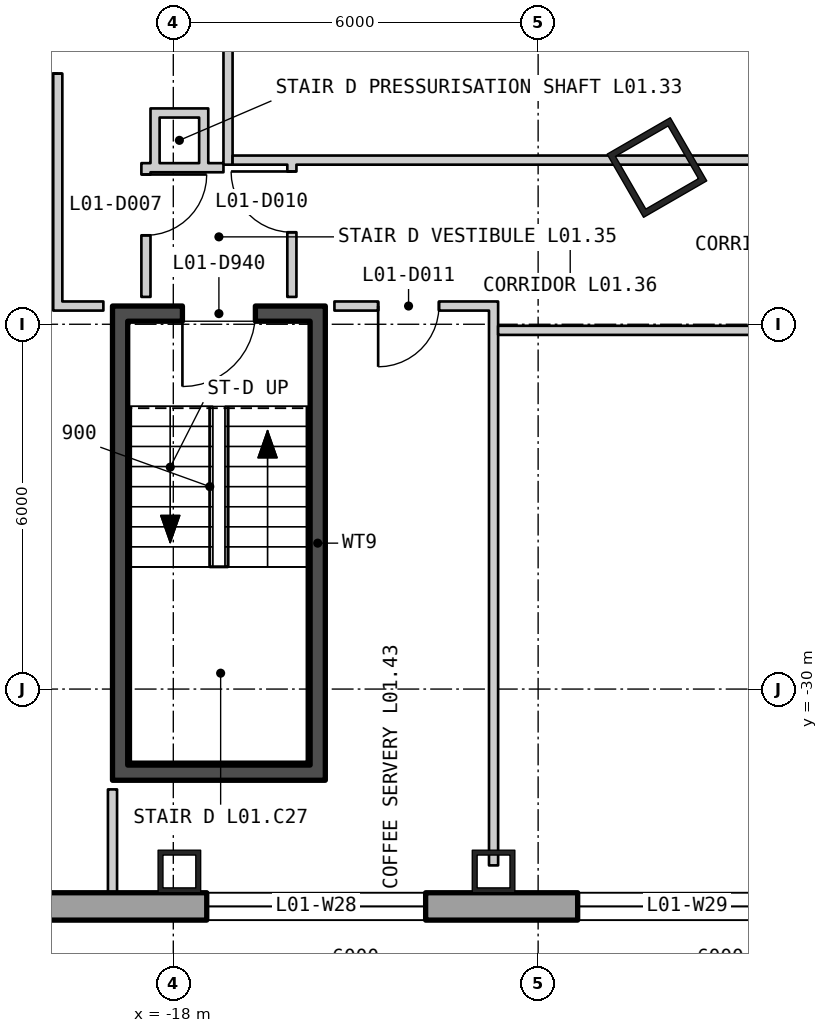
"""IFC4 building model, lengths in metres.
Left out: names, types, materials, properties, quantities, classifications, styles, units other than length and angle.
Written with IfcOpenShell. Run it as: python <this file> out.ifc"""

import sys

from ifc_helpers import new_model, si_unit, direction, frame, frame_2d, origin, origin_2d, place, context, subcontext, project, spatial, polyline, rectangle, hollow_rectangle, outline, extrude, element, fill, save


model = new_model("IFC4")
c1 = context("Model", 3, precision=1e-05, world=origin(), true_north=direction((0.0, 1.0)))
c2 = subcontext(c1, "Body", "Model", "MODEL_VIEW")
j1 = project(units=[si_unit("LENGTHUNIT", "METRE"), si_unit("PLANEANGLEUNIT", "RADIAN")], contexts=[c1])
p1 = place(None, origin())
s1 = spatial("IfcSite", under=j1, at=p1, CompositionType="ELEMENT")
p2 = place(p1, origin())
s2 = spatial("IfcBuilding", under=s1, at=p2, CompositionType="ELEMENT")
p3 = place(p2, frame((0.0, 0.0, 8.4)))
s3 = spatial("IfcBuildingStorey", under=s2, at=p3, CompositionType="ELEMENT", Elevation=8.4)
p4 = place(p3, frame((-10.046, -21.422, 0.0), z_axis=(0.0, 0.0, 1.0), x_axis=(0.5, -0.866025403784, 0.0)))
e1 = element("IfcColumn", 1, at=p4, inside=s3, PredefinedType="COLUMN", context=c2, shape_type="SweptSolid", body=[
    extrude(hollow_rectangle(XDim=1.2, YDim=1.2, WallThickness=0.1, at=origin_2d()), origin(), (0.0, 0.0, 1.0), 5.1),
])
for number, where, z_axis, x_axis in (
    (2, (-17.9, -33.0, 0.0), (0.0, 0.0, 1.0), (1.0, 0.0, 0.0)),
    (3, (-12.733, -33.0, 0.0), (0.0, 0.0, 1.0), (1.0, 0.0, 0.0)),
):
    element("IfcColumn", number, at=place(p3, frame(where, z_axis=z_axis, x_axis=x_axis)), inside=s3, PredefinedType="COLUMN", context=c2, shape_type="SweptSolid", body=[
        extrude(hollow_rectangle(XDim=0.7, YDim=0.7, WallThickness=0.08, at=origin_2d()), origin(), (0.0, 0.0, 1.0), 5.1),
    ])
p5 = place(p3, frame((-38.775, -33.575, -0.4), z_axis=(0.0, 0.0, 1.0), x_axis=(1.0, 0.0, 0.0)))
e4 = element("IfcWall", 4, at=p5, inside=s3, PredefinedType="SOLIDWALL", context=c2, shape_type="SweptSolid", body=[
    extrude(outline(polyline([(-0.225, -0.225), (77.775, -0.225), (77.325, 0.225), (0.225, 0.225), (-0.225, -0.225)])), origin(), (0.0, 0.0, 1.0), 5.1),
])
p6 = place(p5, frame((1.958, 0.0, 1.3)))
e5 = element("IfcOpeningElement", 5, at=p6, cuts=e4, PredefinedType="OPENING", context=c2, shape_type="SweptSolid", body=[
    extrude(rectangle(XDim=3.6, YDim=3.2, at=frame_2d((1.8, 1.6))), frame((0.0, 0.235, 0.0), z_axis=(0.0, -1.0, 0.0), x_axis=(1.0, 0.0, 0.0)), (0.0, 0.0, 1.0), 0.47),
])
p7 = place(p5, frame((8.325, 0.0, 1.3)))
e6 = element("IfcOpeningElement", 6, at=p7, cuts=e4, PredefinedType="OPENING", context=c2, shape_type="SweptSolid", body=[
    extrude(rectangle(XDim=3.6, YDim=3.2, at=frame_2d((1.8, 1.6))), frame((0.0, 0.235, 0.0), z_axis=(0.0, -1.0, 0.0), x_axis=(1.0, 0.0, 0.0)), (0.0, 0.0, 1.0), 0.47),
])
p8 = place(p5, frame((14.692, 0.0, 1.3)))
e7 = element("IfcOpeningElement", 7, at=p8, cuts=e4, PredefinedType="OPENING", context=c2, shape_type="SweptSolid", body=[
    extrude(rectangle(XDim=3.6, YDim=3.2, at=frame_2d((1.8, 1.6))), frame((0.0, 0.235, 0.0), z_axis=(0.0, -1.0, 0.0), x_axis=(1.0, 0.0, 0.0)), (0.0, 0.0, 1.0), 0.47),
])
p9 = place(p5, frame((21.325, 0.0, 1.3)))
e8 = element("IfcOpeningElement", 8, at=p9, cuts=e4, PredefinedType="OPENING", context=c2, shape_type="SweptSolid", body=[
    extrude(rectangle(XDim=3.6, YDim=3.2, at=frame_2d((1.8, 1.6))), frame((0.0, 0.235, 0.0), z_axis=(0.0, -1.0, 0.0), x_axis=(1.0, 0.0, 0.0)), (0.0, 0.0, 1.0), 0.47),
])
p10 = place(p5, frame((27.425, 0.0, 1.3)))
e9 = element("IfcOpeningElement", 9, at=p10, cuts=e4, PredefinedType="OPENING", context=c2, shape_type="SweptSolid", body=[
    extrude(rectangle(XDim=3.6, YDim=3.2, at=frame_2d((1.8, 1.6))), frame((0.0, 0.235, 0.0), z_axis=(0.0, -1.0, 0.0), x_axis=(1.0, 0.0, 0.0)), (0.0, 0.0, 1.0), 0.47),
])
p11 = place(p5, frame((33.792, 0.0, 1.3)))
e10 = element("IfcOpeningElement", 10, at=p11, cuts=e4, PredefinedType="OPENING", context=c2, shape_type="SweptSolid", body=[
    extrude(rectangle(XDim=3.6, YDim=3.2, at=frame_2d((1.8, 1.6))), frame((0.0, 0.235, 0.0), z_axis=(0.0, -1.0, 0.0), x_axis=(1.0, 0.0, 0.0)), (0.0, 0.0, 1.0), 0.47),
])
p12 = place(p5, frame((40.158, 0.0, 1.3)))
e11 = element("IfcOpeningElement", 11, at=p12, cuts=e4, PredefinedType="OPENING", context=c2, shape_type="SweptSolid", body=[
    extrude(rectangle(XDim=3.6, YDim=3.2, at=frame_2d((1.8, 1.6))), frame((0.0, 0.235, 0.0), z_axis=(0.0, -1.0, 0.0), x_axis=(1.0, 0.0, 0.0)), (0.0, 0.0, 1.0), 0.47),
])
p13 = place(p5, frame((46.525, 0.0, 1.3)))
e12 = element("IfcOpeningElement", 12, at=p13, cuts=e4, PredefinedType="OPENING", context=c2, shape_type="SweptSolid", body=[
    extrude(rectangle(XDim=3.6, YDim=3.2, at=frame_2d((1.8, 1.6))), frame((0.0, 0.235, 0.0), z_axis=(0.0, -1.0, 0.0), x_axis=(1.0, 0.0, 0.0)), (0.0, 0.0, 1.0), 0.47),
])
p14 = place(p5, frame((52.625, 0.0, 1.3)))
e13 = element("IfcOpeningElement", 13, at=p14, cuts=e4, PredefinedType="OPENING", context=c2, shape_type="SweptSolid", body=[
    extrude(rectangle(XDim=3.6, YDim=3.2, at=frame_2d((1.8, 1.6))), frame((0.0, 0.235, 0.0), z_axis=(0.0, -1.0, 0.0), x_axis=(1.0, 0.0, 0.0)), (0.0, 0.0, 1.0), 0.47),
])
p15 = place(p5, frame((59.258, 0.0, 1.3)))
e14 = element("IfcOpeningElement", 14, at=p15, cuts=e4, PredefinedType="OPENING", context=c2, shape_type="SweptSolid", body=[
    extrude(rectangle(XDim=3.6, YDim=3.2, at=frame_2d((1.8, 1.6))), frame((0.0, 0.235, 0.0), z_axis=(0.0, -1.0, 0.0), x_axis=(1.0, 0.0, 0.0)), (0.0, 0.0, 1.0), 0.47),
])
p16 = place(p5, frame((65.625, 0.0, 1.3)))
e15 = element("IfcOpeningElement", 15, at=p16, cuts=e4, PredefinedType="OPENING", context=c2, shape_type="SweptSolid", body=[
    extrude(rectangle(XDim=3.6, YDim=3.2, at=frame_2d((1.8, 1.6))), frame((0.0, 0.235, 0.0), z_axis=(0.0, -1.0, 0.0), x_axis=(1.0, 0.0, 0.0)), (0.0, 0.0, 1.0), 0.47),
])
p17 = place(p5, frame((71.992, 0.0, 1.3)))
e16 = element("IfcOpeningElement", 16, at=p17, cuts=e4, PredefinedType="OPENING", context=c2, shape_type="SweptSolid", body=[
    extrude(rectangle(XDim=3.6, YDim=3.2, at=frame_2d((1.8, 1.6))), frame((0.0, 0.235, 0.0), z_axis=(0.0, -1.0, 0.0), x_axis=(1.0, 0.0, 0.0)), (0.0, 0.0, 1.0), 0.47),
])
for number, where, z_axis, x_axis in (
    (17, (-18.875, -31.25, 0.0), (0.0, 0.0, 1.0), (0.0, 1.0, 0.0)),
    (18, (-15.625, -31.25, 0.0), (0.0, 0.0, 1.0), (0.0, 1.0, 0.0)),
):
    element("IfcWall", number, at=place(p3, frame(where, z_axis=z_axis, x_axis=x_axis)), inside=s3, PredefinedType="SHEAR", context=c2, shape_type="SweptSolid", body=[
        extrude(rectangle(XDim=7.3, YDim=0.25, at=frame_2d((3.65, 0.0))), origin(), (0.0, 0.0, 1.0), 4.88),
    ])
p18 = place(p3, frame((-19.0, -31.375, 0.0), z_axis=(0.0, 0.0, 1.0), x_axis=(1.0, 0.0, 0.0)))
e19 = element("IfcWall", 19, at=p18, inside=s3, PredefinedType="SHEAR", context=c2, shape_type="SweptSolid", body=[
    extrude(rectangle(XDim=3.5, YDim=0.25, at=frame_2d((1.75, 0.0))), origin(), (0.0, 0.0, 1.0), 4.88),
])
p19 = place(p3, frame((-19.0, -23.825, 0.0), z_axis=(0.0, 0.0, 1.0), x_axis=(1.0, 0.0, 0.0)))
e20 = element("IfcWall", 20, at=p19, inside=s3, PredefinedType="SHEAR", context=c2, shape_type="SweptSolid", body=[
    extrude(rectangle(XDim=3.5, YDim=0.25, at=frame_2d((1.75, 0.0))), origin(), (0.0, 0.0, 1.0), 4.88),
])
p20 = place(p19, frame((1.15, 0.0, 0.0)))
e21 = element("IfcOpeningElement", 21, at=p20, cuts=e20, PredefinedType="OPENING", context=c2, shape_type="SweptSolid", body=[
    extrude(rectangle(XDim=1.2, YDim=2.1, at=frame_2d((0.6, 1.05))), frame((0.0, 0.135, 0.0), z_axis=(0.0, -1.0, 0.0), x_axis=(1.0, 0.0, 0.0)), (0.0, 0.0, 1.0), 0.27),
])
p21 = place(p3, frame((-25.026, -19.825, 0.0), z_axis=(0.0, 0.0, 1.0), x_axis=(0.707106781187, 0.707106781187, 0.0)))
e22 = element("IfcWall", 22, at=p21, inside=s3, PredefinedType="PARTITIONING", context=c2, shape_type="SweptSolid", body=[
    extrude(rectangle(XDim=7.068, YDim=0.15, at=frame_2d((3.534, 0.0))), origin(), (0.0, 0.0, 1.0), 4.88),
])
p22 = place(p3, frame((-19.9, -23.775, 0.0), z_axis=(0.0, 0.0, 1.0), x_axis=(0.0, 1.0, 0.0)))
e23 = element("IfcWall", 23, at=p22, inside=s3, PredefinedType="PARTITIONING", context=c2, shape_type="SweptSolid", body=[
    extrude(rectangle(XDim=21.25, YDim=0.15, at=frame_2d((10.625, 0.0))), origin(), (0.0, 0.0, 1.0), 4.88),
])
p23 = place(p22, frame((3.898, 0.0, 0.0)))
e24 = element("IfcOpeningElement", 24, at=p23, cuts=e23, PredefinedType="OPENING", context=c2, shape_type="SweptSolid", body=[
    extrude(rectangle(XDim=1.0, YDim=2.1, at=frame_2d((0.5, 1.05))), frame((0.0, 0.085, 0.0), z_axis=(0.0, -1.0, 0.0), x_axis=(1.0, 0.0, 0.0)), (0.0, 0.0, 1.0), 0.17),
])
p24 = place(p22, frame((12.399, 0.0, 0.0)))
e25 = element("IfcOpeningElement", 25, at=p24, cuts=e23, PredefinedType="OPENING", context=c2, shape_type="SweptSolid", body=[
    extrude(rectangle(XDim=1.0, YDim=2.1, at=frame_2d((0.5, 1.05))), frame((0.0, 0.085, 0.0), z_axis=(0.0, -1.0, 0.0), x_axis=(1.0, 0.0, 0.0)), (0.0, 0.0, 1.0), 0.17),
])
p25 = place(p3, frame((-19.825, -23.7, 0.0), z_axis=(0.0, 0.0, 1.0), x_axis=(1.0, 0.0, 0.0)))
e26 = element("IfcWall", 26, at=p25, inside=s3, PredefinedType="PARTITIONING", context=c2, shape_type="SweptSolid", body=[
    extrude(rectangle(XDim=0.675, YDim=0.15, at=frame_2d((0.338, 0.0))), origin(), (0.0, 0.0, 1.0), 4.88),
])
p26 = place(p3, frame((-19.0, -33.348, 0.0), z_axis=(0.0, 0.0, 1.0), x_axis=(0.0, 1.0, 0.0)))
e27 = element("IfcWall", 27, at=p26, inside=s3, PredefinedType="PARTITIONING", context=c2, shape_type="SweptSolid", body=[
    extrude(rectangle(XDim=0.448, YDim=0.15, at=frame_2d((0.224, 0.0))), origin(), (0.0, 0.0, 1.0), 4.88),
])
p27 = place(p3, frame((-19.0, -32.9, 0.0), z_axis=(0.0, 0.0, 1.0), x_axis=(0.0, 1.0, 0.0)))
e28 = element("IfcWall", 28, at=p27, inside=s3, PredefinedType="PARTITIONING", context=c2, shape_type="SweptSolid", body=[
    extrude(rectangle(XDim=1.25, YDim=0.15, at=frame_2d((0.625, 0.0))), origin(), (0.0, 0.0, 1.0), 4.19),
])
p28 = place(p3, frame((-18.45, -23.55, 0.0), z_axis=(0.0, 0.0, 1.0), x_axis=(0.0, 1.0, 0.0)))
e29 = element("IfcWall", 29, at=p28, inside=s3, PredefinedType="PARTITIONING", context=c2, shape_type="SweptSolid", body=[
    extrude(rectangle(XDim=2.2, YDim=0.15, at=frame_2d((1.1, 0.0))), origin(), (0.0, 0.0, 1.0), 4.88),
])
p29 = place(p28, frame((1.013, 0.0, 0.0)))
e30 = element("IfcOpeningElement", 30, at=p29, cuts=e29, PredefinedType="OPENING", context=c2, shape_type="SweptSolid", body=[
    extrude(rectangle(XDim=1.0, YDim=2.1, at=frame_2d((0.5, 1.05))), frame((0.0, 0.085, 0.0), z_axis=(0.0, -1.0, 0.0), x_axis=(1.0, 0.0, 0.0)), (0.0, 0.0, 1.0), 0.17),
])
p30 = place(p3, frame((-18.3, -21.5, 0.0), z_axis=(0.0, 0.0, 1.0), x_axis=(0.0, 1.0, 0.0)))
e31 = element("IfcWall", 31, at=p30, inside=s3, PredefinedType="PARTITIONING", context=c2, shape_type="SweptSolid", body=[
    extrude(rectangle(XDim=1.05, YDim=0.15, at=frame_2d((0.525, 0.0))), origin(), (0.0, 0.0, 1.0), 4.88),
])
for number, where, z_axis, x_axis in (
    (32, (-18.225, -21.425, 0.0), (0.0, 0.0, 1.0), (1.0, 0.0, 0.0)),
    (33, (-18.225, -20.525, 0.0), (0.0, 0.0, 1.0), (1.0, 0.0, 0.0)),
):
    element("IfcWall", number, at=place(p3, frame(where, z_axis=z_axis, x_axis=x_axis)), inside=s3, PredefinedType="PARTITIONING", context=c2, shape_type="SweptSolid", body=[
        extrude(rectangle(XDim=0.65, YDim=0.15, at=frame_2d((0.325, 0.0))), origin(), (0.0, 0.0, 1.0), 4.88),
    ])
p31 = place(p3, frame((-17.5, -21.5, 0.0), z_axis=(0.0, 0.0, 1.0), x_axis=(0.0, 1.0, 0.0)))
e34 = element("IfcWall", 34, at=p31, inside=s3, PredefinedType="PARTITIONING", context=c2, shape_type="SweptSolid", body=[
    extrude(rectangle(XDim=1.05, YDim=0.15, at=frame_2d((0.525, 0.0))), origin(), (0.0, 0.0, 1.0), 4.88),
])
p32 = place(p3, frame((-17.425, -21.425, 0.0), z_axis=(0.0, 0.0, 1.0), x_axis=(1.0, 0.0, 0.0)))
e35 = element("IfcWall", 35, at=p32, inside=s3, PredefinedType="PARTITIONING", context=c2, shape_type="SweptSolid", body=[
    extrude(rectangle(XDim=0.25, YDim=0.15, at=frame_2d((0.125, 0.0))), origin(), (0.0, 0.0, 1.0), 4.88),
])
p33 = place(p3, frame((-17.1, -21.375, 0.0), z_axis=(0.0, 0.0, 1.0), x_axis=(0.0, 1.0, 0.0)))
e36 = element("IfcWall", 36, at=p33, inside=s3, PredefinedType="PARTITIONING", context=c2, shape_type="SweptSolid", body=[
    extrude(rectangle(XDim=19.05, YDim=0.15, at=frame_2d((9.525, 0.0))), origin(), (0.0, 0.0, 1.0), 4.88),
])
p34 = place(p33, frame((17.475, 0.0, 0.0)))
e37 = element("IfcOpeningElement", 37, at=p34, cuts=e36, PredefinedType="OPENING", context=c2, shape_type="SweptSolid", body=[
    extrude(rectangle(XDim=1.0, YDim=2.1, at=frame_2d((0.5, 1.05))), frame((0.0, 0.085, 0.0), z_axis=(0.0, -1.0, 0.0), x_axis=(1.0, 0.0, 0.0)), (0.0, 0.0, 1.0), 0.17),
])
p35 = place(p3, frame((-17.025, -21.3, 0.0), z_axis=(0.0, 0.0, 1.0), x_axis=(1.0, 0.0, 0.0)))
e38 = element("IfcWall", 38, at=p35, inside=s3, PredefinedType="PARTITIONING", context=c2, shape_type="SweptSolid", body=[
    extrude(rectangle(XDim=10.655, YDim=0.15, at=frame_2d((5.327, 0.0))), origin(), (0.0, 0.0, 1.0), 4.88),
])
p36 = place(p3, frame((-16.05, -23.55, 0.0), z_axis=(0.0, 0.0, 1.0), x_axis=(0.0, 1.0, 0.0)))
e39 = element("IfcWall", 39, at=p36, inside=s3, PredefinedType="PARTITIONING", context=c2, shape_type="SweptSolid", body=[
    extrude(rectangle(XDim=2.175, YDim=0.15, at=frame_2d((1.087, 0.0))), origin(), (0.0, 0.0, 1.0), 4.88),
])
p37 = place(p36, frame((1.063, 0.0, 0.0)))
e40 = element("IfcOpeningElement", 40, at=p37, cuts=e39, PredefinedType="OPENING", context=c2, shape_type="SweptSolid", body=[
    extrude(rectangle(XDim=1.0, YDim=2.1, at=frame_2d((0.5, 1.05))), frame((0.0, 0.085, 0.0), z_axis=(0.0, -1.0, 0.0), x_axis=(1.0, 0.0, 0.0)), (0.0, 0.0, 1.0), 0.17),
])
p38 = place(p3, frame((-15.35, -23.7, 0.0), z_axis=(0.0, 0.0, 1.0), x_axis=(1.0, 0.0, 0.0)))
e41 = element("IfcWall", 41, at=p38, inside=s3, PredefinedType="PARTITIONING", context=c2, shape_type="SweptSolid", body=[
    extrude(rectangle(XDim=2.542, YDim=0.15, at=frame_2d((1.271, 0.0))), origin(), (0.0, 0.0, 1.0), 4.88),
])
p39 = place(p38, frame((0.719, 0.0, 0.0)))
e42 = element("IfcOpeningElement", 42, at=p39, cuts=e41, PredefinedType="OPENING", context=c2, shape_type="SweptSolid", body=[
    extrude(rectangle(XDim=1.0, YDim=2.1, at=frame_2d((0.5, 1.05))), frame((0.0, 0.085, 0.0), z_axis=(0.0, -1.0, 0.0), x_axis=(1.0, 0.0, 0.0)), (0.0, 0.0, 1.0), 0.17),
])
p40 = place(p3, frame((-12.733, -32.9, 0.0), z_axis=(0.0, 0.0, 1.0), x_axis=(0.0, 1.0, 0.0)))
e43 = element("IfcWall", 43, at=p40, inside=s3, PredefinedType="PARTITIONING", context=c2, shape_type="SweptSolid", body=[
    extrude(rectangle(XDim=9.275, YDim=0.15, at=frame_2d((4.638, 0.0))), origin(), (0.0, 0.0, 1.0), 4.19),
])
p41 = place(p3, frame((-12.658, -24.1, 0.0), z_axis=(0.0, 0.0, 1.0), x_axis=(1.0, 0.0, 0.0)))
e44 = element("IfcWall", 44, at=p41, inside=s3, PredefinedType="PARTITIONING", context=c2, shape_type="SweptSolid", body=[
    extrude(rectangle(XDim=6.373, YDim=0.15, at=frame_2d((3.187, 0.0))), origin(), (0.0, 0.0, 1.0), 4.88),
])
p42 = place(p9, origin())
e45 = element("IfcWindow", 45, at=p42, inside=s3, PartitioningType="SINGLE_PANEL", PredefinedType="WINDOW", context=c2, shape_type="SweptSolid", body=[
    extrude(rectangle(XDim=3.6, YDim=3.2, at=frame_2d((1.8, 1.6))), frame((0.0, 0.105, 0.0), z_axis=(0.0, -1.0, 0.0), x_axis=(1.0, 0.0, 0.0)), (0.0, 0.0, 1.0), 0.06),
])
fill(e8, e45)
p43 = place(p10, origin())
e46 = element("IfcWindow", 46, at=p43, inside=s3, PartitioningType="SINGLE_PANEL", PredefinedType="WINDOW", context=c2, shape_type="SweptSolid", body=[
    extrude(rectangle(XDim=3.6, YDim=3.2, at=frame_2d((1.8, 1.6))), frame((0.0, 0.105, 0.0), z_axis=(0.0, -1.0, 0.0), x_axis=(1.0, 0.0, 0.0)), (0.0, 0.0, 1.0), 0.06),
])
fill(e9, e46)
p44 = place(p20, origin())
e47 = element("IfcDoor", 47, at=p44, inside=s3, OperationType="SINGLE_SWING_LEFT", PredefinedType="DOOR", context=c2, shape_type="SweptSolid", body=[
    extrude(rectangle(XDim=1.2, YDim=2.1, at=frame_2d((0.6, 1.05))), frame((0.0, 0.025, 0.0), z_axis=(0.0, -1.0, 0.0), x_axis=(1.0, 0.0, 0.0)), (0.0, 0.0, 1.0), 0.05),
])
fill(e21, e47)
p45 = place(p23, origin())
e48 = element("IfcDoor", 48, at=p45, inside=s3, OperationType="SINGLE_SWING_RIGHT", PredefinedType="DOOR", context=c2, shape_type="SweptSolid", body=[
    extrude(rectangle(XDim=1.0, YDim=2.1, at=frame_2d((0.5, 1.05))), frame((0.0, 0.025, 0.0), z_axis=(0.0, -1.0, 0.0), x_axis=(1.0, 0.0, 0.0)), (0.0, 0.0, 1.0), 0.05),
])
fill(e24, e48)
p46 = place(p29, origin())
e49 = element("IfcDoor", 49, at=p46, inside=s3, OperationType="SINGLE_SWING_RIGHT", PredefinedType="DOOR", context=c2, shape_type="SweptSolid", body=[
    extrude(rectangle(XDim=1.0, YDim=2.1, at=frame_2d((0.5, 1.05))), frame((0.0, 0.025, 0.0), z_axis=(0.0, -1.0, 0.0), x_axis=(1.0, 0.0, 0.0)), (0.0, 0.0, 1.0), 0.05),
])
fill(e30, e49)
p47 = place(p37, origin())
e50 = element("IfcDoor", 50, at=p47, inside=s3, OperationType="SINGLE_SWING_LEFT", PredefinedType="DOOR", context=c2, shape_type="SweptSolid", body=[
    extrude(rectangle(XDim=1.0, YDim=2.1, at=frame_2d((0.5, 1.05))), frame((0.0, 0.025, 0.0), z_axis=(0.0, -1.0, 0.0), x_axis=(1.0, 0.0, 0.0)), (0.0, 0.0, 1.0), 0.05),
])
fill(e40, e50)
p48 = place(p39, origin())
e51 = element("IfcDoor", 51, at=p48, inside=s3, OperationType="SINGLE_SWING_LEFT", PredefinedType="DOOR", context=c2, shape_type="SweptSolid", body=[
    extrude(rectangle(XDim=1.0, YDim=2.1, at=frame_2d((0.5, 1.05))), frame((0.0, 0.025, 0.0), z_axis=(0.0, -1.0, 0.0), x_axis=(1.0, 0.0, 0.0)), (0.0, 0.0, 1.0), 0.05),
])
fill(e42, e51)
save(model, sys.argv[1])
